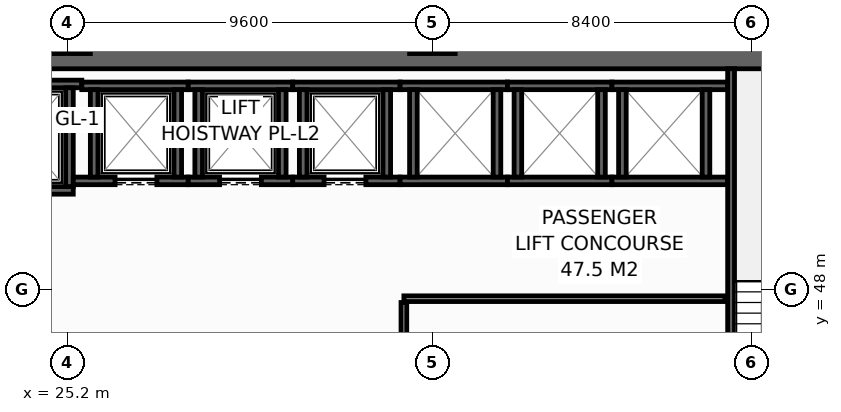
"""IFC4 building model, lengths in metres.
Left out: names, types, materials, properties, quantities, classifications, styles, units other than length and angle.
Written with IfcOpenShell. Run it as: python <this file> out.ifc"""

import sys

from ifc_helpers import new_model, si_unit, direction, frame, frame_2d, origin, origin_2d, place, context, subcontext, project, spatial, rectangle, hollow_rectangle, extrude, element, fill, save


model = new_model("IFC4")
c1 = context("Model", 3, precision=1e-05, world=origin(), true_north=direction((0.0, 1.0)))
c2 = subcontext(c1, "Body", "Model", "MODEL_VIEW")
j1 = project(units=[si_unit("LENGTHUNIT", "METRE"), si_unit("PLANEANGLEUNIT", "RADIAN")], contexts=[c1])
p1 = place(None, origin())
s1 = spatial("IfcSite", under=j1, at=p1, CompositionType="ELEMENT")
p2 = place(p1, origin())
s2 = spatial("IfcBuilding", under=s1, at=p2, CompositionType="ELEMENT")
p3 = place(p2, frame((0.0, 0.0, 42.8)))
s3 = spatial("IfcBuildingStorey", under=s2, at=p3, CompositionType="ELEMENT", Elevation=42.8)
p4 = place(p3, frame((13.5, 54.1, 0.0), z_axis=(0.0, 0.0, 1.0), x_axis=(1.0, 0.0, 0.0)))
e1 = element("IfcWall", 1, at=p4, inside=s3, PredefinedType="SHEAR", context=c2, shape_type="SweptSolid", body=[
    extrude(rectangle(XDim=32.9, YDim=0.6, at=frame_2d((16.45, 0.0))), origin(), (0.0, 0.0, 1.0), 4.15),
])
for number, where, z_axis, x_axis in (
    (2, (25.2, 54.8, 0.0), (0.0, 0.0, 1.0), (1.0, 0.0, 0.0)),
    (3, (34.8, 54.8, 0.0), (0.0, 0.0, 1.0), (1.0, 0.0, 0.0)),
):
    element("IfcColumn", number, at=place(p3, frame(where, z_axis=z_axis, x_axis=x_axis)), inside=s3, PredefinedType="COLUMN", context=c2, shape_type="SweptSolid", body=[
        extrude(hollow_rectangle(XDim=1.2, YDim=1.2, WallThickness=0.055, at=origin_2d()), origin(), (0.0, 0.0, 1.0), 4.4),
    ])
p5 = place(p3, frame((22.5, 50.6, 0.0), z_axis=(0.0, 0.0, 1.0), x_axis=(1.0, 0.0, 0.0)))
e4 = element("IfcWall", 4, at=p5, inside=s3, PredefinedType="SHEAR", context=c2, shape_type="SweptSolid", body=[
    extrude(rectangle(XDim=2.85, YDim=0.2, at=frame_2d((1.425, 0.0))), origin(), (0.0, 0.0, 1.0), 4.15),
])
p6 = place(p5, frame((0.925, 0.0, 0.0)))
e5 = element("IfcOpeningElement", 5, at=p6, cuts=e4, PredefinedType="OPENING", context=c2, shape_type="SweptSolid", body=[
    extrude(rectangle(XDim=1.25, YDim=2.3, at=frame_2d((0.625, 1.15))), frame((0.0, 0.11, 0.0), z_axis=(0.0, -1.0, 0.0), x_axis=(1.0, 0.0, 0.0)), (0.0, 0.0, 1.0), 0.22),
])
p7 = place(p3, frame((22.5, 53.4, 0.0), z_axis=(0.0, 0.0, 1.0), x_axis=(1.0, 0.0, 0.0)))
e6 = element("IfcWall", 6, at=p7, inside=s3, PredefinedType="SHEAR", context=c2, shape_type="SweptSolid", body=[
    extrude(rectangle(XDim=3.075, YDim=0.2, at=frame_2d((1.538, 0.0))), origin(), (0.0, 0.0, 1.0), 4.15),
])
p8 = place(p3, frame((25.25, 50.7, 0.0), z_axis=(0.0, 0.0, 1.0), x_axis=(0.0, 1.0, 0.0)))
e7 = element("IfcWall", 7, at=p8, inside=s3, PredefinedType="SHEAR", context=c2, shape_type="SweptSolid", body=[
    extrude(rectangle(XDim=2.6, YDim=0.2, at=frame_2d((1.3, 0.0))), origin(), (0.0, 0.0, 1.0), 4.15),
])
p9 = place(p3, frame((25.35, 50.85, 0.0), z_axis=(0.0, 0.0, 1.0), x_axis=(1.0, 0.0, 0.0)))
e8 = element("IfcWall", 8, at=p9, inside=s3, PredefinedType="SHEAR", context=c2, shape_type="SweptSolid", body=[
    extrude(rectangle(XDim=3.025, YDim=0.2, at=frame_2d((1.512, 0.0))), origin(), (0.0, 0.0, 1.0), 4.15),
])
p10 = place(p9, frame((1.1, 0.0, 0.0)))
e9 = element("IfcOpeningElement", 9, at=p10, cuts=e8, PredefinedType="OPENING", context=c2, shape_type="SweptSolid", body=[
    extrude(rectangle(XDim=1.1, YDim=2.2, at=frame_2d((0.55, 1.1))), frame((0.0, 0.11, 0.0), z_axis=(0.0, -1.0, 0.0), x_axis=(1.0, 0.0, 0.0)), (0.0, 0.0, 1.0), 0.22),
])
p11 = place(p3, frame((25.575, 53.35, 0.0), z_axis=(0.0, 0.0, 1.0), x_axis=(1.0, 0.0, 0.0)))
e10 = element("IfcWall", 10, at=p11, inside=s3, PredefinedType="SHEAR", context=c2, shape_type="SweptSolid", body=[
    extrude(rectangle(XDim=2.8, YDim=0.2, at=frame_2d((1.4, 0.0))), origin(), (0.0, 0.0, 1.0), 4.15),
])
for number, where, z_axis, x_axis in (
    (11, (25.9, 50.95, 0.0), (0.0, 0.0, 1.0), (0.0, 1.0, 0.0)),
    (12, (28.1, 50.95, 0.0), (0.0, 0.0, 1.0), (0.0, 1.0, 0.0)),
):
    element("IfcWall", number, at=place(p3, frame(where, z_axis=z_axis, x_axis=x_axis)), inside=s3, PredefinedType="SHEAR", context=c2, shape_type="SweptSolid", body=[
        extrude(rectangle(XDim=2.3, YDim=0.2, at=frame_2d((1.15, 0.0))), origin(), (0.0, 0.0, 1.0), 4.15),
    ])
p12 = place(p3, frame((28.375, 50.85, 0.0), z_axis=(0.0, 0.0, 1.0), x_axis=(1.0, 0.0, 0.0)))
e13 = element("IfcWall", 13, at=p12, inside=s3, PredefinedType="SHEAR", context=c2, shape_type="SweptSolid", body=[
    extrude(rectangle(XDim=2.75, YDim=0.2, at=frame_2d((1.375, 0.0))), origin(), (0.0, 0.0, 1.0), 4.15),
])
p13 = place(p12, frame((0.825, 0.0, 0.0)))
e14 = element("IfcOpeningElement", 14, at=p13, cuts=e13, PredefinedType="OPENING", context=c2, shape_type="SweptSolid", body=[
    extrude(rectangle(XDim=1.1, YDim=2.2, at=frame_2d((0.55, 1.1))), frame((0.0, 0.11, 0.0), z_axis=(0.0, -1.0, 0.0), x_axis=(1.0, 0.0, 0.0)), (0.0, 0.0, 1.0), 0.22),
])
p14 = place(p3, frame((28.375, 53.35, 0.0), z_axis=(0.0, 0.0, 1.0), x_axis=(1.0, 0.0, 0.0)))
e15 = element("IfcWall", 15, at=p14, inside=s3, PredefinedType="SHEAR", context=c2, shape_type="SweptSolid", body=[
    extrude(rectangle(XDim=2.75, YDim=0.2, at=frame_2d((1.375, 0.0))), origin(), (0.0, 0.0, 1.0), 4.15),
])
for number, where, z_axis, x_axis in (
    (16, (28.65, 50.95, 0.0), (0.0, 0.0, 1.0), (0.0, 1.0, 0.0)),
    (17, (30.85, 50.95, 0.0), (0.0, 0.0, 1.0), (0.0, 1.0, 0.0)),
):
    element("IfcWall", number, at=place(p3, frame(where, z_axis=z_axis, x_axis=x_axis)), inside=s3, PredefinedType="SHEAR", context=c2, shape_type="SweptSolid", body=[
        extrude(rectangle(XDim=2.3, YDim=0.2, at=frame_2d((1.15, 0.0))), origin(), (0.0, 0.0, 1.0), 4.15),
    ])
p15 = place(p3, frame((31.125, 50.85, 0.0), z_axis=(0.0, 0.0, 1.0), x_axis=(1.0, 0.0, 0.0)))
e18 = element("IfcWall", 18, at=p15, inside=s3, PredefinedType="SHEAR", context=c2, shape_type="SweptSolid", body=[
    extrude(rectangle(XDim=2.825, YDim=0.2, at=frame_2d((1.413, 0.0))), origin(), (0.0, 0.0, 1.0), 4.15),
])
p16 = place(p15, frame((0.825, 0.0, 0.0)))
e19 = element("IfcOpeningElement", 19, at=p16, cuts=e18, PredefinedType="OPENING", context=c2, shape_type="SweptSolid", body=[
    extrude(rectangle(XDim=1.1, YDim=2.2, at=frame_2d((0.55, 1.1))), frame((0.0, 0.11, 0.0), z_axis=(0.0, -1.0, 0.0), x_axis=(1.0, 0.0, 0.0)), (0.0, 0.0, 1.0), 0.22),
])
p17 = place(p3, frame((31.125, 53.35, 0.0), z_axis=(0.0, 0.0, 1.0), x_axis=(1.0, 0.0, 0.0)))
e20 = element("IfcWall", 20, at=p17, inside=s3, PredefinedType="SHEAR", context=c2, shape_type="SweptSolid", body=[
    extrude(rectangle(XDim=2.825, YDim=0.2, at=frame_2d((1.413, 0.0))), origin(), (0.0, 0.0, 1.0), 4.15),
])
for number, where, z_axis, x_axis in (
    (21, (31.4, 50.95, 0.0), (0.0, 0.0, 1.0), (0.0, 1.0, 0.0)),
    (22, (33.6, 50.95, 0.0), (0.0, 0.0, 1.0), (0.0, 1.0, 0.0)),
):
    element("IfcWall", number, at=place(p3, frame(where, z_axis=z_axis, x_axis=x_axis)), inside=s3, PredefinedType="SHEAR", context=c2, shape_type="SweptSolid", body=[
        extrude(rectangle(XDim=2.3, YDim=0.2, at=frame_2d((1.15, 0.0))), origin(), (0.0, 0.0, 1.0), 4.15),
    ])
for number, where, z_axis, x_axis in (
    (23, (33.95, 50.85, 0.0), (0.0, 0.0, 1.0), (1.0, 0.0, 0.0)),
    (24, (33.95, 53.35, 0.0), (0.0, 0.0, 1.0), (1.0, 0.0, 0.0)),
):
    element("IfcWall", number, at=place(p3, frame(where, z_axis=z_axis, x_axis=x_axis)), inside=s3, PredefinedType="SHEAR", context=c2, shape_type="SweptSolid", body=[
        extrude(rectangle(XDim=2.825, YDim=0.2, at=frame_2d((1.413, 0.0))), origin(), (0.0, 0.0, 1.0), 4.15),
    ])
for number, where, z_axis, x_axis in (
    (25, (34.3, 50.95, 0.0), (0.0, 0.0, 1.0), (0.0, 1.0, 0.0)),
    (26, (36.5, 50.95, 0.0), (0.0, 0.0, 1.0), (0.0, 1.0, 0.0)),
):
    element("IfcWall", number, at=place(p3, frame(where, z_axis=z_axis, x_axis=x_axis)), inside=s3, PredefinedType="SHEAR", context=c2, shape_type="SweptSolid", body=[
        extrude(rectangle(XDim=2.3, YDim=0.2, at=frame_2d((1.15, 0.0))), origin(), (0.0, 0.0, 1.0), 4.15),
    ])
for number, where, z_axis, x_axis in (
    (27, (36.775, 50.85, 0.0), (0.0, 0.0, 1.0), (1.0, 0.0, 0.0)),
    (28, (36.775, 53.35, 0.0), (0.0, 0.0, 1.0), (1.0, 0.0, 0.0)),
):
    element("IfcWall", number, at=place(p3, frame(where, z_axis=z_axis, x_axis=x_axis)), inside=s3, PredefinedType="SHEAR", context=c2, shape_type="SweptSolid", body=[
        extrude(rectangle(XDim=2.75, YDim=0.2, at=frame_2d((1.375, 0.0))), origin(), (0.0, 0.0, 1.0), 4.15),
    ])
for number, where, z_axis, x_axis in (
    (29, (37.05, 50.95, 0.0), (0.0, 0.0, 1.0), (0.0, 1.0, 0.0)),
    (30, (39.25, 50.95, 0.0), (0.0, 0.0, 1.0), (0.0, 1.0, 0.0)),
):
    element("IfcWall", number, at=place(p3, frame(where, z_axis=z_axis, x_axis=x_axis)), inside=s3, PredefinedType="SHEAR", context=c2, shape_type="SweptSolid", body=[
        extrude(rectangle(XDim=2.3, YDim=0.2, at=frame_2d((1.15, 0.0))), origin(), (0.0, 0.0, 1.0), 4.15),
    ])
for number, where, z_axis, x_axis in (
    (31, (39.525, 50.85, 0.0), (0.0, 0.0, 1.0), (1.0, 0.0, 0.0)),
    (32, (39.525, 53.35, 0.0), (0.0, 0.0, 1.0), (1.0, 0.0, 0.0)),
):
    element("IfcWall", number, at=place(p3, frame(where, z_axis=z_axis, x_axis=x_axis)), inside=s3, PredefinedType="SHEAR", context=c2, shape_type="SweptSolid", body=[
        extrude(rectangle(XDim=3.045, YDim=0.2, at=frame_2d((1.522, 0.0))), origin(), (0.0, 0.0, 1.0), 4.15),
    ])
for number, where, z_axis, x_axis in (
    (33, (39.8, 50.95, 0.0), (0.0, 0.0, 1.0), (0.0, 1.0, 0.0)),
    (34, (42.0, 50.95, 0.0), (0.0, 0.0, 1.0), (0.0, 1.0, 0.0)),
):
    element("IfcWall", number, at=place(p3, frame(where, z_axis=z_axis, x_axis=x_axis)), inside=s3, PredefinedType="SHEAR", context=c2, shape_type="SweptSolid", body=[
        extrude(rectangle(XDim=2.3, YDim=0.2, at=frame_2d((1.15, 0.0))), origin(), (0.0, 0.0, 1.0), 4.15),
    ])
p18 = place(p3, frame((42.66, 53.8, 0.0), z_axis=(0.0, 0.0, 1.0), x_axis=(0.0, -1.0, 0.0)))
e35 = element("IfcWall", 35, at=p18, inside=s3, PredefinedType="SHEAR", context=c2, shape_type="SweptSolid", body=[
    extrude(rectangle(XDim=10.4, YDim=0.18, at=frame_2d((5.2, 0.0))), origin(), (0.0, 0.0, 1.0), 4.15),
])
p19 = place(p18, frame((8.99, 0.0, 0.0)))
e36 = element("IfcOpeningElement", 36, at=p19, cuts=e35, PredefinedType="OPENING", context=c2, shape_type="SweptSolid", body=[
    extrude(rectangle(XDim=1.1, YDim=2.15, at=frame_2d((0.55, 1.075))), frame((0.0, 0.1, 0.0), z_axis=(0.0, -1.0, 0.0), x_axis=(1.0, 0.0, 0.0)), (0.0, 0.0, 1.0), 0.2),
])
p20 = place(p3, frame((34.05, 47.75, 0.0), z_axis=(0.0, 0.0, 1.0), x_axis=(1.0, 0.0, 0.0)))
e37 = element("IfcWall", 37, at=p20, inside=s3, PredefinedType="PARTITIONING", context=c2, shape_type="SweptSolid", body=[
    extrude(rectangle(XDim=8.45, YDim=0.15, at=frame_2d((4.225, 0.0))), origin(), (0.0, 0.0, 1.0), 4.15),
])
p21 = place(p3, frame((34.05, 45.22, 0.0), z_axis=(0.0, 0.0, 1.0), x_axis=(0.0, 1.0, 0.0)))
e38 = element("IfcWall", 38, at=p21, inside=s3, PredefinedType="PARTITIONING", context=c2, shape_type="SweptSolid", body=[
    extrude(rectangle(XDim=2.43, YDim=0.15, at=frame_2d((1.215, 0.0))), origin(), (0.0, 0.0, 1.0), 4.15),
])
p22 = place(p10, origin())
e39 = element("IfcDoor", 39, at=p22, inside=s3, OperationType="SLIDING_TO_LEFT", PredefinedType="DOOR", context=c2, shape_type="SweptSolid", body=[
    extrude(rectangle(XDim=1.1, YDim=2.2, at=frame_2d((0.55, 1.1))), frame((0.0, 0.025, 0.0), z_axis=(0.0, -1.0, 0.0), x_axis=(1.0, 0.0, 0.0)), (0.0, 0.0, 1.0), 0.05),
])
fill(e9, e39)
p23 = place(p13, origin())
e40 = element("IfcDoor", 40, at=p23, inside=s3, OperationType="SLIDING_TO_LEFT", PredefinedType="DOOR", context=c2, shape_type="SweptSolid", body=[
    extrude(rectangle(XDim=1.1, YDim=2.2, at=frame_2d((0.55, 1.1))), frame((0.0, 0.025, 0.0), z_axis=(0.0, -1.0, 0.0), x_axis=(1.0, 0.0, 0.0)), (0.0, 0.0, 1.0), 0.05),
])
fill(e14, e40)
p24 = place(p16, origin())
e41 = element("IfcDoor", 41, at=p24, inside=s3, OperationType="SLIDING_TO_LEFT", PredefinedType="DOOR", context=c2, shape_type="SweptSolid", body=[
    extrude(rectangle(XDim=1.1, YDim=2.2, at=frame_2d((0.55, 1.1))), frame((0.0, 0.025, 0.0), z_axis=(0.0, -1.0, 0.0), x_axis=(1.0, 0.0, 0.0)), (0.0, 0.0, 1.0), 0.05),
])
fill(e19, e41)
save(model, sys.argv[1])
